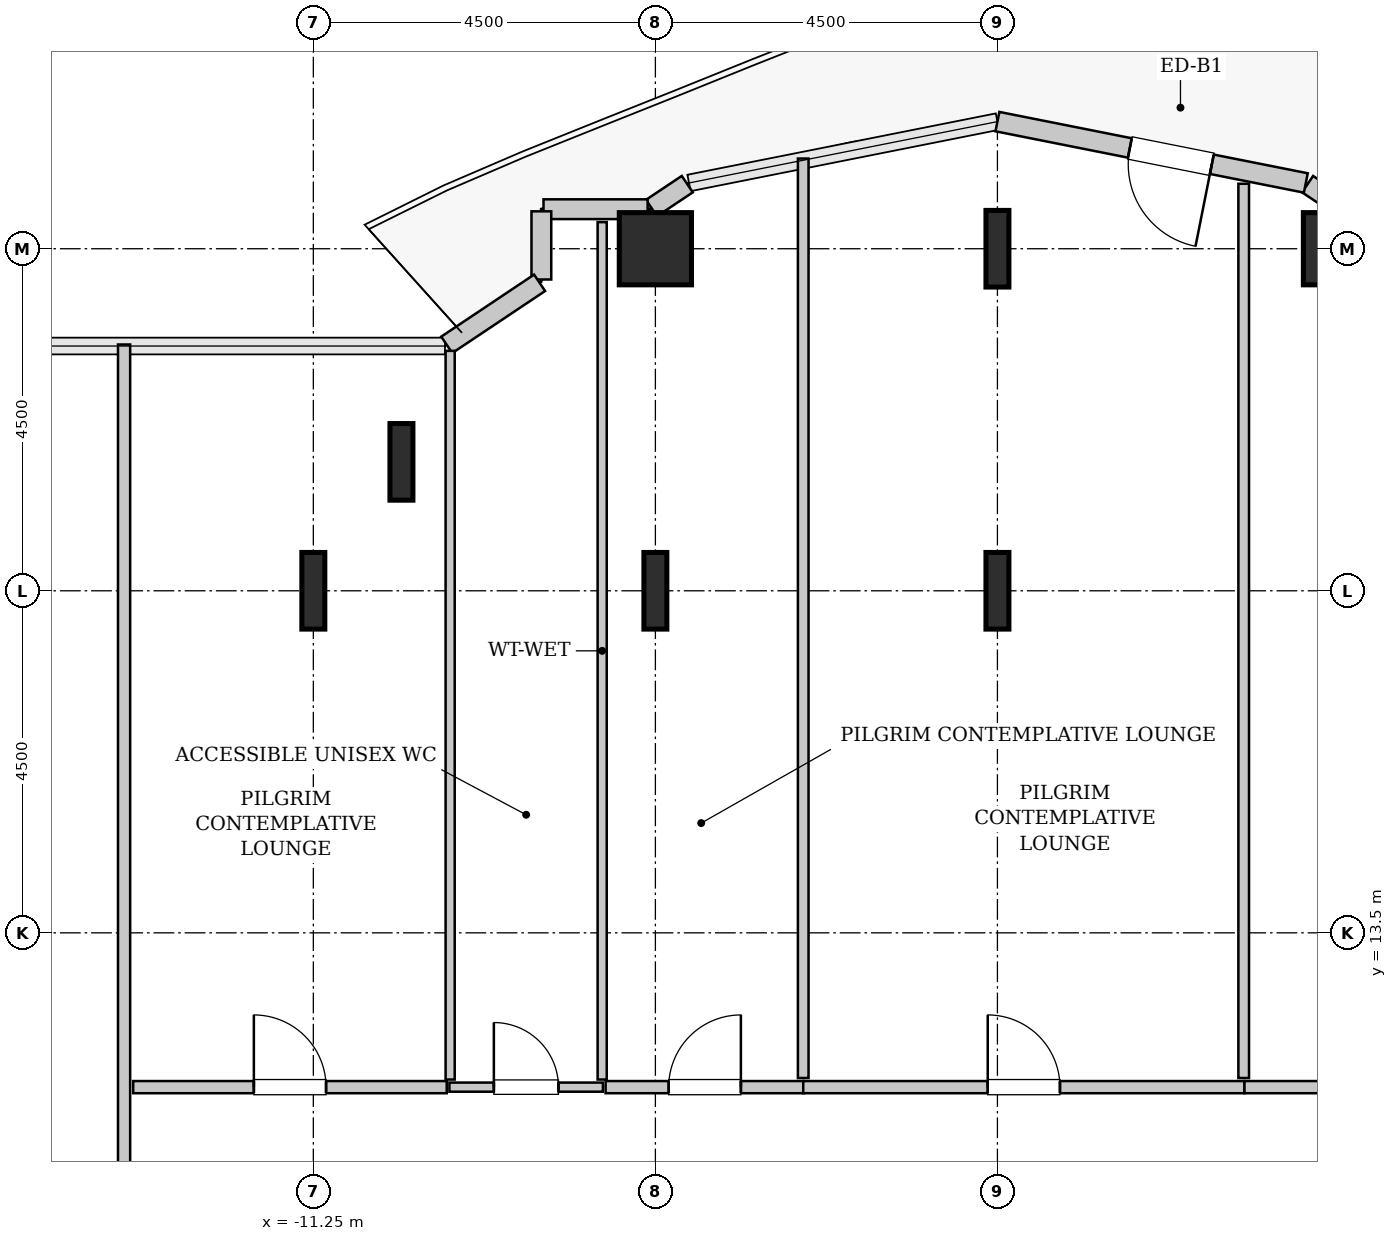
"""IFC4 building model, lengths in metres.
Left out: names, types, materials, properties, quantities, classifications, styles, units other than length and angle.
Written with IfcOpenShell. Run it as: python <this file> out.ifc"""

import sys

from ifc_helpers import new_model, si_unit, direction, frame, frame_2d, origin, origin_2d, place, context, subcontext, project, spatial, rectangle, hollow_rectangle, i_section, extrude, source, transform, mapped, element, fill, save


model = new_model("IFC4")
c1 = context("Model", 3, precision=1e-05, world=origin(), true_north=direction((0.0, 1.0)))
c2 = subcontext(c1, "Body", "Model", "MODEL_VIEW")
j1 = project(units=[si_unit("LENGTHUNIT", "METRE"), si_unit("PLANEANGLEUNIT", "RADIAN")], contexts=[c1])
p1 = place(None, origin())
s1 = spatial("IfcSite", under=j1, at=p1, CompositionType="ELEMENT")
p2 = place(p1, origin())
s2 = spatial("IfcBuilding", under=s1, at=p2, CompositionType="ELEMENT")
p3 = place(p2, frame((0.0, 0.0, 44.4)))
s3 = spatial("IfcBuildingStorey", under=s2, at=p3, CompositionType="ELEMENT", Elevation=44.4)
m1 = source(origin(), c2, "Body", "SweptSolid", [
    extrude(i_section(OverallWidth=0.302, OverallDepth=1.008, WebThickness=0.021, FlangeThickness=0.04, FilletRadius=0.03, at=origin_2d()), origin(), (0.0, 0.0, 1.0), 3.8),
])
for number, where, z_axis, x_axis in (
    (1, (-11.25, 18.0, 0.0), (0.0, 0.0, 1.0), (1.0, 0.0, 0.0)),
    (2, (-10.091, 19.696, 0.0), (0.0, 0.0, 1.0), (1.0, 0.0, 0.0)),
    (3, (-6.75, 18.0, 0.0), (0.0, 0.0, 1.0), (1.0, 0.0, 0.0)),
):
    element("IfcColumn", number, at=place(p3, frame(where, z_axis=z_axis, x_axis=x_axis)), inside=s3, PredefinedType="COLUMN", context=c2, shape_type="MappedRepresentation", body=[
        mapped(m1, transform((0.0, 0.0, 0.0), x_axis=(1.0, 0.0, 0.0), y_axis=(0.0, 1.0, 0.0), z_axis=(0.0, 0.0, 1.0), scale=1.0)),
    ])
m2 = source(origin(), c2, "Body", "SweptSolid", [
    extrude(hollow_rectangle(XDim=0.95, YDim=0.95, WallThickness=0.045, InnerFilletRadius=0.045, OuterFilletRadius=0.09, at=origin_2d()), origin(), (0.0, 0.0, 1.0), 3.8),
])
p4 = place(p3, frame((-6.75, 22.5, 0.0), z_axis=(0.0, 0.0, 1.0), x_axis=(1.0, 0.0, 0.0)))
e4 = element("IfcColumn", 4, at=p4, inside=s3, PredefinedType="COLUMN", context=c2, shape_type="MappedRepresentation", body=[
    mapped(m2, transform((0.0, 0.0, 0.0), x_axis=(1.0, 0.0, 0.0), y_axis=(0.0, 1.0, 0.0), z_axis=(0.0, 0.0, 1.0), scale=1.0)),
])
for number, where, z_axis, x_axis in (
    (5, (-2.25, 18.0, 0.0), (0.0, 0.0, 1.0), (1.0, 0.0, 0.0)),
    (6, (-2.25, 22.5, 0.0), (0.0, 0.0, 1.0), (1.0, 0.0, 0.0)),
):
    element("IfcColumn", number, at=place(p3, frame(where, z_axis=z_axis, x_axis=x_axis)), inside=s3, PredefinedType="COLUMN", context=c2, shape_type="MappedRepresentation", body=[
        mapped(m1, transform((0.0, 0.0, 0.0), x_axis=(1.0, 0.0, 0.0), y_axis=(0.0, 1.0, 0.0), z_axis=(0.0, 0.0, 1.0), scale=1.0)),
    ])
p5 = place(p3, frame((2.25, 22.5, 0.0), z_axis=(0.0, 0.0, 1.0), x_axis=(1.0, 0.0, 0.0)))
e7 = element("IfcColumn", 7, at=p5, inside=s3, PredefinedType="COLUMN", context=c2, shape_type="MappedRepresentation", body=[
    mapped(m2, transform((0.0, 0.0, 0.0), x_axis=(1.0, 0.0, 0.0), y_axis=(0.0, 1.0, 0.0), z_axis=(0.0, 0.0, 1.0), scale=1.0)),
])
m3 = source(origin(), c2, "Body", "SweptSolid", [
    extrude(rectangle(XDim=0.565, YDim=0.26, at=frame_2d((0.283, 0.0))), origin(), (0.0, 0.0, 1.0), 3.55),
])
p6 = place(p3, frame((2.301, 23.036, 0.0), z_axis=(0.0, 0.0, 1.0), x_axis=(-0.831651492666, 0.555297933317, 0.0)))
e8 = element("IfcWall", 8, at=p6, inside=s3, PredefinedType="SOLIDWALL", context=c2, shape_type="MappedRepresentation", body=[
    mapped(m3, transform((0.0, 0.0, 0.0), x_axis=(1.0, 0.0, 0.0), y_axis=(0.0, 1.0, 0.0), z_axis=(0.0, 0.0, 1.0), scale=1.0)),
])
m4 = source(origin(), c2, "Body", "SweptSolid", [
    extrude(rectangle(XDim=4.137, YDim=0.26, at=frame_2d((2.068, 0.0))), origin(), (0.0, 0.0, 1.0), 3.55),
])
p7 = place(p3, frame((1.807, 23.365, 0.0), z_axis=(0.0, 0.0, 1.0), x_axis=(-0.980782170794, 0.195105954428, 0.0)))
e9 = element("IfcWall", 9, at=p7, inside=s3, PredefinedType="SOLIDWALL", context=c2, shape_type="MappedRepresentation", body=[
    mapped(m4, transform((0.0, 0.0, 0.0), x_axis=(1.0, 0.0, 0.0), y_axis=(0.0, 1.0, 0.0), z_axis=(0.0, 0.0, 1.0), scale=1.0)),
])
p8 = place(p7, frame((1.261, 0.0, 0.0)))
e10 = element("IfcOpeningElement", 10, at=p8, cuts=e9, PredefinedType="OPENING", context=c2, shape_type="SweptSolid", body=[
    extrude(rectangle(XDim=1.1, YDim=2.2, at=frame_2d((0.55, 1.1))), frame((0.0, 0.14, 0.0), z_axis=(0.0, -1.0, 0.0), x_axis=(1.0, 0.0, 0.0)), (0.0, 0.0, 1.0), 0.28),
])
p9 = place(p3, frame((-6.331, 23.35, 0.0), z_axis=(0.0, 0.0, 1.0), x_axis=(-0.831651492666, -0.555297933317, 0.0)))
e11 = element("IfcWall", 11, at=p9, inside=s3, PredefinedType="SOLIDWALL", context=c2, shape_type="MappedRepresentation", body=[
    mapped(m3, transform((0.0, 0.0, 0.0), x_axis=(1.0, 0.0, 0.0), y_axis=(0.0, 1.0, 0.0), z_axis=(0.0, 0.0, 1.0), scale=1.0)),
])
m5 = source(origin(), c2, "Body", "SweptSolid", [
    extrude(rectangle(XDim=1.37, YDim=0.26, at=frame_2d((0.685, 0.0))), origin(), (0.0, 0.0, 1.0), 3.55),
])
p10 = place(p3, frame((-6.852, 23.02, 0.0), z_axis=(0.0, 0.0, 1.0), x_axis=(-1.0, 0.0, 0.0)))
e12 = element("IfcWall", 12, at=p10, inside=s3, PredefinedType="SOLIDWALL", context=c2, shape_type="MappedRepresentation", body=[
    mapped(m5, transform((0.0, 0.0, 0.0), x_axis=(1.0, 0.0, 0.0), y_axis=(0.0, 1.0, 0.0), z_axis=(0.0, 0.0, 1.0), scale=1.0)),
])
m6 = source(origin(), c2, "Body", "SweptSolid", [
    extrude(rectangle(XDim=0.897, YDim=0.26, at=frame_2d((0.448, 0.0))), origin(), (0.0, 0.0, 1.0), 3.55),
])
p11 = place(p3, frame((-8.25, 22.992, 0.0), z_axis=(0.0, 0.0, 1.0), x_axis=(0.0, -1.0, 0.0)))
e13 = element("IfcWall", 13, at=p11, inside=s3, PredefinedType="SOLIDWALL", context=c2, shape_type="MappedRepresentation", body=[
    mapped(m6, transform((0.0, 0.0, 0.0), x_axis=(1.0, 0.0, 0.0), y_axis=(0.0, 1.0, 0.0), z_axis=(0.0, 0.0, 1.0), scale=1.0)),
])
m7 = source(origin(), c2, "Body", "SweptSolid", [
    extrude(rectangle(XDim=1.469, YDim=0.26, at=frame_2d((0.734, 0.0))), origin(), (0.0, 0.0, 1.0), 3.55),
])
p12 = place(p3, frame((-8.273, 22.052, 0.0), z_axis=(0.0, 0.0, 1.0), x_axis=(-0.831461760506, -0.555581983884, 0.0)))
e14 = element("IfcWall", 14, at=p12, inside=s3, PredefinedType="SOLIDWALL", context=c2, shape_type="MappedRepresentation", body=[
    mapped(m7, transform((0.0, 0.0, 0.0), x_axis=(1.0, 0.0, 0.0), y_axis=(0.0, 1.0, 0.0), z_axis=(0.0, 0.0, 1.0), scale=1.0)),
])
m8 = source(origin(), c2, "Body", "SweptSolid", [
    extrude(rectangle(XDim=2.02, YDim=0.12, at=frame_2d((1.01, 0.0))), origin(), (0.0, 0.0, 1.0), 3.535),
])
p13 = place(p3, frame((-9.46, 11.47, 0.0), z_axis=(0.0, 0.0, 1.0), x_axis=(1.0, 0.0, 0.0)))
e15 = element("IfcWall", 15, at=p13, inside=s3, PredefinedType="PLUMBINGWALL", context=c2, shape_type="MappedRepresentation", body=[
    mapped(m8, transform((0.0, 0.0, 0.0), x_axis=(1.0, 0.0, 0.0), y_axis=(0.0, 1.0, 0.0), z_axis=(0.0, 0.0, 1.0), scale=1.0)),
])
p14 = place(p13, frame((0.585, 0.0, 0.0)))
e16 = element("IfcOpeningElement", 16, at=p14, cuts=e15, PredefinedType="OPENING", context=c2, shape_type="SweptSolid", body=[
    extrude(rectangle(XDim=0.85, YDim=2.1, at=frame_2d((0.425, 1.05))), frame((0.0, 0.07, 0.0), z_axis=(0.0, -1.0, 0.0), x_axis=(1.0, 0.0, 0.0)), (0.0, 0.0, 1.0), 0.14),
])
m9 = source(origin(), c2, "Body", "SweptSolid", [
    extrude(rectangle(XDim=11.28, YDim=0.12, at=frame_2d((5.64, 0.0))), origin(), (0.0, 0.0, 1.0), 3.535),
])
p15 = place(p3, frame((-7.45, 11.57, 0.0), z_axis=(0.0, 0.0, 1.0), x_axis=(0.0, 1.0, 0.0)))
e17 = element("IfcWall", 17, at=p15, inside=s3, PredefinedType="PLUMBINGWALL", context=c2, shape_type="MappedRepresentation", body=[
    mapped(m9, transform((0.0, 0.0, 0.0), x_axis=(1.0, 0.0, 0.0), y_axis=(0.0, 1.0, 0.0), z_axis=(0.0, 0.0, 1.0), scale=1.0)),
])
m10 = source(origin(), c2, "Body", "SweptSolid", [
    extrude(rectangle(XDim=9.587, YDim=0.12, at=frame_2d((4.793, 0.0))), origin(), (0.0, 0.0, 1.0), 3.535),
])
p16 = place(p3, frame((-9.45, 11.57, 0.0), z_axis=(0.0, 0.0, 1.0), x_axis=(0.0, 1.0, 0.0)))
e18 = element("IfcWall", 18, at=p16, inside=s3, PredefinedType="PLUMBINGWALL", context=c2, shape_type="MappedRepresentation", body=[
    mapped(m10, transform((0.0, 0.0, 0.0), x_axis=(1.0, 0.0, 0.0), y_axis=(0.0, 1.0, 0.0), z_axis=(0.0, 0.0, 1.0), scale=1.0)),
])
m11 = source(origin(), c2, "Body", "SweptSolid", [
    extrude(rectangle(XDim=12.845, YDim=0.16, at=frame_2d((6.422, 0.0))), origin(), (0.0, 0.0, 1.0), 3.535),
])
p17 = place(p3, frame((-13.74, 8.395, 0.0), z_axis=(0.0, 0.0, 1.0), x_axis=(0.0, 1.0, 0.0)))
e19 = element("IfcWall", 19, at=p17, inside=s3, PredefinedType="PARTITIONING", context=c2, shape_type="MappedRepresentation", body=[
    mapped(m11, transform((0.0, 0.0, 0.0), x_axis=(1.0, 0.0, 0.0), y_axis=(0.0, 1.0, 0.0), z_axis=(0.0, 0.0, 1.0), scale=1.0)),
])
p18 = place(p17, frame((1.083, 0.0, 0.0)))
e20 = element("IfcOpeningElement", 20, at=p18, cuts=e19, PredefinedType="OPENING", context=c2, shape_type="SweptSolid", body=[
    extrude(rectangle(XDim=0.95, YDim=2.1, at=frame_2d((0.475, 1.05))), frame((0.0, 0.09, 0.0), z_axis=(0.0, -1.0, 0.0), x_axis=(1.0, 0.0, 0.0)), (0.0, 0.0, 1.0), 0.18),
])
m12 = source(origin(), c2, "Body", "SweptSolid", [
    extrude(rectangle(XDim=4.125, YDim=0.16, at=frame_2d((2.062, 0.0))), origin(), (0.0, 0.0, 1.0), 3.535),
])
p19 = place(p3, frame((-13.62, 11.47, 0.0), z_axis=(0.0, 0.0, 1.0), x_axis=(1.0, 0.0, 0.0)))
e21 = element("IfcWall", 21, at=p19, inside=s3, PredefinedType="PARTITIONING", context=c2, shape_type="MappedRepresentation", body=[
    mapped(m12, transform((0.0, 0.0, 0.0), x_axis=(1.0, 0.0, 0.0), y_axis=(0.0, 1.0, 0.0), z_axis=(0.0, 0.0, 1.0), scale=1.0)),
])
p20 = place(p19, frame((1.587, 0.0, 0.0)))
e22 = element("IfcOpeningElement", 22, at=p20, cuts=e21, PredefinedType="OPENING", context=c2, shape_type="SweptSolid", body=[
    extrude(rectangle(XDim=0.95, YDim=2.1, at=frame_2d((0.475, 1.05))), frame((0.0, 0.09, 0.0), z_axis=(0.0, -1.0, 0.0), x_axis=(1.0, 0.0, 0.0)), (0.0, 0.0, 1.0), 0.18),
])
m13 = source(origin(), c2, "Body", "SweptSolid", [
    extrude(rectangle(XDim=2.61, YDim=0.16, at=frame_2d((1.305, 0.0))), origin(), (0.0, 0.0, 1.0), 3.535),
])
p21 = place(p3, frame((-7.405, 11.47, 0.0), z_axis=(0.0, 0.0, 1.0), x_axis=(1.0, 0.0, 0.0)))
e23 = element("IfcWall", 23, at=p21, inside=s3, PredefinedType="PARTITIONING", context=c2, shape_type="MappedRepresentation", body=[
    mapped(m13, transform((0.0, 0.0, 0.0), x_axis=(1.0, 0.0, 0.0), y_axis=(0.0, 1.0, 0.0), z_axis=(0.0, 0.0, 1.0), scale=1.0)),
])
p22 = place(p21, frame((0.83, 0.0, 0.0)))
e24 = element("IfcOpeningElement", 24, at=p22, cuts=e23, PredefinedType="OPENING", context=c2, shape_type="SweptSolid", body=[
    extrude(rectangle(XDim=0.95, YDim=2.1, at=frame_2d((0.475, 1.05))), frame((0.0, 0.09, 0.0), z_axis=(0.0, -1.0, 0.0), x_axis=(1.0, 0.0, 0.0)), (0.0, 0.0, 1.0), 0.18),
])
m14 = source(origin(), c2, "Body", "SweptSolid", [
    extrude(rectangle(XDim=12.096, YDim=0.14, at=frame_2d((6.048, 0.0))), origin(), (0.0, 0.0, 1.0), 3.535),
])
p23 = place(p3, frame((-4.805, 11.59, 0.0), z_axis=(0.0, 0.0, 1.0), x_axis=(0.0, 1.0, 0.0)))
e25 = element("IfcWall", 25, at=p23, inside=s3, PredefinedType="PARTITIONING", context=c2, shape_type="MappedRepresentation", body=[
    mapped(m14, transform((0.0, 0.0, 0.0), x_axis=(1.0, 0.0, 0.0), y_axis=(0.0, 1.0, 0.0), z_axis=(0.0, 0.0, 1.0), scale=1.0)),
])
m15 = source(origin(), c2, "Body", "SweptSolid", [
    extrude(rectangle(XDim=5.805, YDim=0.16, at=frame_2d((2.902, 0.0))), origin(), (0.0, 0.0, 1.0), 3.535),
])
p24 = place(p3, frame((-4.805, 11.47, 0.0), z_axis=(0.0, 0.0, 1.0), x_axis=(1.0, 0.0, 0.0)))
e26 = element("IfcWall", 26, at=p24, inside=s3, PredefinedType="PARTITIONING", context=c2, shape_type="MappedRepresentation", body=[
    mapped(m15, transform((0.0, 0.0, 0.0), x_axis=(1.0, 0.0, 0.0), y_axis=(0.0, 1.0, 0.0), z_axis=(0.0, 0.0, 1.0), scale=1.0)),
])
p25 = place(p24, frame((2.427, 0.0, 0.0)))
e27 = element("IfcOpeningElement", 27, at=p25, cuts=e26, PredefinedType="OPENING", context=c2, shape_type="SweptSolid", body=[
    extrude(rectangle(XDim=0.95, YDim=2.1, at=frame_2d((0.475, 1.05))), frame((0.0, 0.09, 0.0), z_axis=(0.0, -1.0, 0.0), x_axis=(1.0, 0.0, 0.0)), (0.0, 0.0, 1.0), 0.18),
])
m16 = source(origin(), c2, "Body", "SweptSolid", [
    extrude(rectangle(XDim=11.765, YDim=0.14, at=frame_2d((5.882, 0.0))), origin(), (0.0, 0.0, 1.0), 3.535),
])
p26 = place(p3, frame((0.99, 11.59, 0.0), z_axis=(0.0, 0.0, 1.0), x_axis=(0.0, 1.0, 0.0)))
e28 = element("IfcWall", 28, at=p26, inside=s3, PredefinedType="PARTITIONING", context=c2, shape_type="MappedRepresentation", body=[
    mapped(m16, transform((0.0, 0.0, 0.0), x_axis=(1.0, 0.0, 0.0), y_axis=(0.0, 1.0, 0.0), z_axis=(0.0, 0.0, 1.0), scale=1.0)),
])
p27 = place(p3, frame((1.0, 11.47, 0.0), z_axis=(0.0, 0.0, 1.0), x_axis=(1.0, 0.0, 0.0)))
e29 = element("IfcWall", 29, at=p27, inside=s3, PredefinedType="PARTITIONING", context=c2, shape_type="MappedRepresentation", body=[
    mapped(m15, transform((0.0, 0.0, 0.0), x_axis=(1.0, 0.0, 0.0), y_axis=(0.0, 1.0, 0.0), z_axis=(0.0, 0.0, 1.0), scale=1.0)),
])
p28 = place(p27, frame((2.427, 0.0, 0.0)))
e30 = element("IfcOpeningElement", 30, at=p28, cuts=e29, PredefinedType="OPENING", context=c2, shape_type="SweptSolid", body=[
    extrude(rectangle(XDim=0.95, YDim=2.1, at=frame_2d((0.475, 1.05))), frame((0.0, 0.09, 0.0), z_axis=(0.0, -1.0, 0.0), x_axis=(1.0, 0.0, 0.0)), (0.0, 0.0, 1.0), 0.18),
])
m17 = source(origin(), c2, "Body", "SweptSolid", [
    extrude(rectangle(XDim=1.1, YDim=2.2, at=frame_2d((0.55, 1.1))), frame((0.0, 0.025, 0.0), z_axis=(0.0, -1.0, 0.0), x_axis=(1.0, 0.0, 0.0)), (0.0, 0.0, 1.0), 0.05),
])
p29 = place(p8, origin())
e31 = element("IfcDoor", 31, at=p29, inside=s3, OperationType="SINGLE_SWING_LEFT", PredefinedType="DOOR", context=c2, shape_type="MappedRepresentation", body=[
    mapped(m17, transform((0.0, 0.0, 0.0), x_axis=(1.0, 0.0, 0.0), y_axis=(0.0, 1.0, 0.0), z_axis=(0.0, 0.0, 1.0), scale=1.0)),
])
fill(e10, e31)
m18 = source(origin(), c2, "Body", "SweptSolid", [
    extrude(rectangle(XDim=0.85, YDim=2.1, at=frame_2d((0.425, 1.05))), frame((0.0, 0.025, 0.0), z_axis=(0.0, -1.0, 0.0), x_axis=(1.0, 0.0, 0.0)), (0.0, 0.0, 1.0), 0.05),
])
p30 = place(p14, origin())
e32 = element("IfcDoor", 32, at=p30, inside=s3, OperationType="SINGLE_SWING_LEFT", PredefinedType="DOOR", context=c2, shape_type="MappedRepresentation", body=[
    mapped(m18, transform((0.0, 0.0, 0.0), x_axis=(1.0, 0.0, 0.0), y_axis=(0.0, 1.0, 0.0), z_axis=(0.0, 0.0, 1.0), scale=1.0)),
])
fill(e16, e32)
m19 = source(origin(), c2, "Body", "SweptSolid", [
    extrude(rectangle(XDim=0.95, YDim=2.1, at=frame_2d((0.475, 1.05))), frame((0.0, 0.025, 0.0), z_axis=(0.0, -1.0, 0.0), x_axis=(1.0, 0.0, 0.0)), (0.0, 0.0, 1.0), 0.05),
])
p31 = place(p20, origin())
e33 = element("IfcDoor", 33, at=p31, inside=s3, OperationType="SINGLE_SWING_LEFT", PredefinedType="DOOR", context=c2, shape_type="MappedRepresentation", body=[
    mapped(m19, transform((0.0, 0.0, 0.0), x_axis=(1.0, 0.0, 0.0), y_axis=(0.0, 1.0, 0.0), z_axis=(0.0, 0.0, 1.0), scale=1.0)),
])
fill(e22, e33)
p32 = place(p22, origin())
e34 = element("IfcDoor", 34, at=p32, inside=s3, OperationType="SINGLE_SWING_RIGHT", PredefinedType="DOOR", context=c2, shape_type="MappedRepresentation", body=[
    mapped(m19, transform((0.0, 0.0, 0.0), x_axis=(1.0, 0.0, 0.0), y_axis=(0.0, 1.0, 0.0), z_axis=(0.0, 0.0, 1.0), scale=1.0)),
])
fill(e24, e34)
p33 = place(p25, origin())
e35 = element("IfcDoor", 35, at=p33, inside=s3, OperationType="SINGLE_SWING_LEFT", PredefinedType="DOOR", context=c2, shape_type="MappedRepresentation", body=[
    mapped(m19, transform((0.0, 0.0, 0.0), x_axis=(1.0, 0.0, 0.0), y_axis=(0.0, 1.0, 0.0), z_axis=(0.0, 0.0, 1.0), scale=1.0)),
])
fill(e27, e35)
save(model, sys.argv[1])
